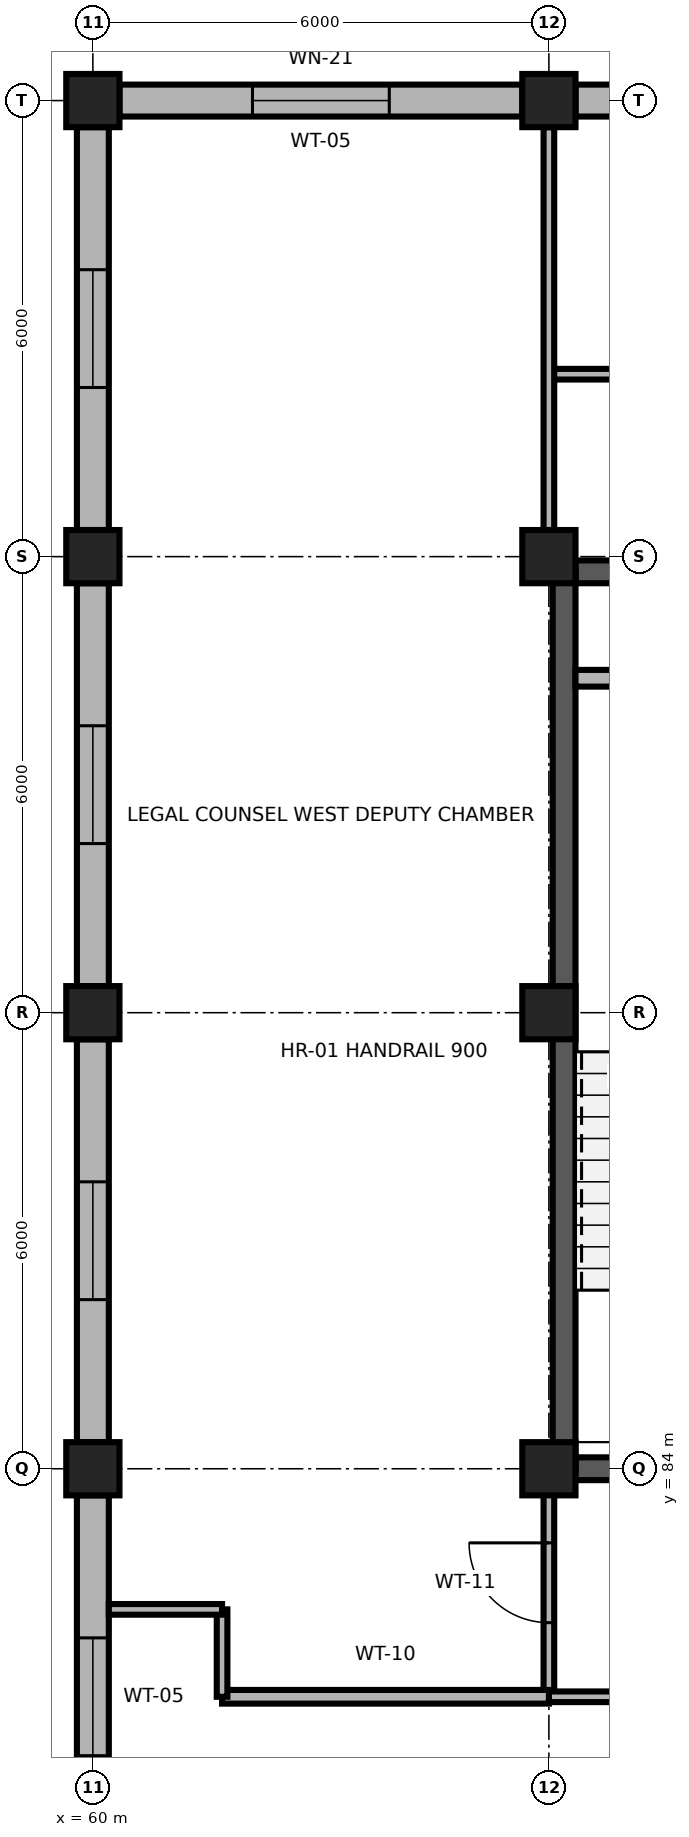
"""IFC4 building model, lengths in metres.
Left out: names, types, materials, properties, quantities, classifications, styles, units other than length and angle.
Written with IfcOpenShell. Run it as: python <this file> out.ifc"""

import sys

from ifc_helpers import new_model, si_unit, direction, frame, frame_2d, origin, origin_2d, place, context, subcontext, project, spatial, rectangle, extrude, element, fill, save


model = new_model("IFC4")
c1 = context("Model", 3, precision=1e-05, world=origin(), true_north=direction((0.0, 1.0)))
c2 = subcontext(c1, "Body", "Model", "MODEL_VIEW")
j1 = project(units=[si_unit("LENGTHUNIT", "METRE"), si_unit("PLANEANGLEUNIT", "RADIAN")], contexts=[c1])
p1 = place(None, origin())
s1 = spatial("IfcSite", under=j1, at=p1, CompositionType="ELEMENT")
p2 = place(p1, origin())
s2 = spatial("IfcBuilding", under=s1, at=p2, CompositionType="ELEMENT")
p3 = place(p2, frame((0.0, 0.0, 60.0)))
s3 = spatial("IfcBuildingStorey", under=s2, at=p3, CompositionType="ELEMENT", Elevation=60.0)
for number, where, z_axis, x_axis in (
    (1, (60.0, 84.0, 0.0), (0.0, 0.0, 1.0), (1.0, 0.0, 0.0)),
    (2, (66.0, 84.0, 0.0), (0.0, 0.0, 1.0), (1.0, 0.0, 0.0)),
    (3, (60.0, 90.0, 0.0), (0.0, 0.0, 1.0), (1.0, 0.0, 0.0)),
    (4, (66.0, 90.0, 0.0), (0.0, 0.0, 1.0), (1.0, 0.0, 0.0)),
    (5, (60.0, 96.0, 0.0), (0.0, 0.0, 1.0), (1.0, 0.0, 0.0)),
    (6, (66.0, 96.0, 0.0), (0.0, 0.0, 1.0), (1.0, 0.0, 0.0)),
    (7, (60.0, 102.0, 0.0), (0.0, 0.0, 1.0), (1.0, 0.0, 0.0)),
    (8, (66.0, 102.0, 0.0), (0.0, 0.0, 1.0), (1.0, 0.0, 0.0)),
):
    element("IfcColumn", number, at=place(p3, frame(where, z_axis=z_axis, x_axis=x_axis)), inside=s3, PredefinedType="COLUMN", context=c2, shape_type="SweptSolid", body=[
        extrude(rectangle(XDim=0.7, YDim=0.7, at=origin_2d()), origin(), (0.0, 0.0, 1.0), 3.9),
    ])
p4 = place(p3, frame((60.35, 102.0, 0.0), z_axis=(0.0, 0.0, 1.0), x_axis=(1.0, 0.0, 0.0)))
e9 = element("IfcWall", 9, at=p4, inside=s3, PredefinedType="SOLIDWALL", context=c2, shape_type="SweptSolid", body=[
    extrude(rectangle(XDim=5.3, YDim=0.42, at=frame_2d((2.65, 0.0))), origin(), (0.0, 0.0, 1.0), 3.32),
])
p5 = place(p4, frame((1.75, 0.0, 0.85)))
e10 = element("IfcOpeningElement", 10, at=p5, cuts=e9, PredefinedType="OPENING", context=c2, shape_type="SweptSolid", body=[
    extrude(rectangle(XDim=1.8, YDim=1.95, at=frame_2d((0.9, 0.975))), frame((0.0, 0.225, 0.0), z_axis=(0.0, -1.0, 0.0), x_axis=(1.0, 0.0, 0.0)), (0.0, 0.0, 1.0), 0.45),
])
p6 = place(p3, frame((66.35, 102.0, 0.0), z_axis=(0.0, 0.0, 1.0), x_axis=(1.0, 0.0, 0.0)))
e11 = element("IfcWall", 11, at=p6, inside=s3, PredefinedType="SOLIDWALL", context=c2, shape_type="SweptSolid", body=[
    extrude(rectangle(XDim=5.3, YDim=0.42, at=frame_2d((2.65, 0.0))), origin(), (0.0, 0.0, 1.0), 3.32),
])
p7 = place(p6, frame((1.75, 0.0, 0.85)))
e12 = element("IfcOpeningElement", 12, at=p7, cuts=e11, PredefinedType="OPENING", context=c2, shape_type="SweptSolid", body=[
    extrude(rectangle(XDim=1.8, YDim=1.95, at=frame_2d((0.9, 0.975))), frame((0.0, 0.225, 0.0), z_axis=(0.0, -1.0, 0.0), x_axis=(1.0, 0.0, 0.0)), (0.0, 0.0, 1.0), 0.45),
])
p8 = place(p3, frame((60.0, 78.35, 0.0), z_axis=(0.0, 0.0, 1.0), x_axis=(0.0, 1.0, 0.0)))
e13 = element("IfcWall", 13, at=p8, inside=s3, PredefinedType="SOLIDWALL", context=c2, shape_type="SweptSolid", body=[
    extrude(rectangle(XDim=5.3, YDim=0.42, at=frame_2d((2.65, 0.0))), origin(), (0.0, 0.0, 1.0), 3.32),
])
p9 = place(p8, frame((1.875, 0.0, 0.85)))
e14 = element("IfcOpeningElement", 14, at=p9, cuts=e13, PredefinedType="OPENING", context=c2, shape_type="SweptSolid", body=[
    extrude(rectangle(XDim=1.55, YDim=1.9, at=frame_2d((0.775, 0.95))), frame((0.0, 0.225, 0.0), z_axis=(0.0, -1.0, 0.0), x_axis=(1.0, 0.0, 0.0)), (0.0, 0.0, 1.0), 0.45),
])
p10 = place(p3, frame((60.0, 84.35, 0.0), z_axis=(0.0, 0.0, 1.0), x_axis=(0.0, 1.0, 0.0)))
e15 = element("IfcWall", 15, at=p10, inside=s3, PredefinedType="SOLIDWALL", context=c2, shape_type="SweptSolid", body=[
    extrude(rectangle(XDim=5.3, YDim=0.42, at=frame_2d((2.65, 0.0))), origin(), (0.0, 0.0, 1.0), 3.32),
])
p11 = place(p10, frame((1.875, 0.0, 0.85)))
e16 = element("IfcOpeningElement", 16, at=p11, cuts=e15, PredefinedType="OPENING", context=c2, shape_type="SweptSolid", body=[
    extrude(rectangle(XDim=1.55, YDim=1.9, at=frame_2d((0.775, 0.95))), frame((0.0, 0.225, 0.0), z_axis=(0.0, -1.0, 0.0), x_axis=(1.0, 0.0, 0.0)), (0.0, 0.0, 1.0), 0.45),
])
p12 = place(p3, frame((60.0, 90.35, 0.0), z_axis=(0.0, 0.0, 1.0), x_axis=(0.0, 1.0, 0.0)))
e17 = element("IfcWall", 17, at=p12, inside=s3, PredefinedType="SOLIDWALL", context=c2, shape_type="SweptSolid", body=[
    extrude(rectangle(XDim=5.3, YDim=0.42, at=frame_2d((2.65, 0.0))), origin(), (0.0, 0.0, 1.0), 3.32),
])
p13 = place(p12, frame((1.875, 0.0, 0.85)))
e18 = element("IfcOpeningElement", 18, at=p13, cuts=e17, PredefinedType="OPENING", context=c2, shape_type="SweptSolid", body=[
    extrude(rectangle(XDim=1.55, YDim=1.9, at=frame_2d((0.775, 0.95))), frame((0.0, 0.225, 0.0), z_axis=(0.0, -1.0, 0.0), x_axis=(1.0, 0.0, 0.0)), (0.0, 0.0, 1.0), 0.45),
])
p14 = place(p3, frame((60.0, 96.35, 0.0), z_axis=(0.0, 0.0, 1.0), x_axis=(0.0, 1.0, 0.0)))
e19 = element("IfcWall", 19, at=p14, inside=s3, PredefinedType="SOLIDWALL", context=c2, shape_type="SweptSolid", body=[
    extrude(rectangle(XDim=5.3, YDim=0.42, at=frame_2d((2.65, 0.0))), origin(), (0.0, 0.0, 1.0), 3.32),
])
p15 = place(p14, frame((1.875, 0.0, 0.85)))
e20 = element("IfcOpeningElement", 20, at=p15, cuts=e19, PredefinedType="OPENING", context=c2, shape_type="SweptSolid", body=[
    extrude(rectangle(XDim=1.55, YDim=1.9, at=frame_2d((0.775, 0.95))), frame((0.0, 0.225, 0.0), z_axis=(0.0, -1.0, 0.0), x_axis=(1.0, 0.0, 0.0)), (0.0, 0.0, 1.0), 0.45),
])
p16 = place(p3, frame((66.35, 84.0, 0.0), z_axis=(0.0, 0.0, 1.0), x_axis=(1.0, 0.0, 0.0)))
e21 = element("IfcWall", 21, at=p16, inside=s3, PredefinedType="SHEAR", context=c2, shape_type="SweptSolid", body=[
    extrude(rectangle(XDim=5.3, YDim=0.3, at=frame_2d((2.65, 0.0))), origin(), (0.0, 0.0, 1.0), 3.66),
])
p17 = place(p16, frame((1.975, 0.0, 0.0)))
e22 = element("IfcOpeningElement", 22, at=p17, cuts=e21, PredefinedType="OPENING", context=c2, shape_type="SweptSolid", body=[
    extrude(rectangle(XDim=1.35, YDim=2.2, at=frame_2d((0.675, 1.1))), frame((0.0, 0.165, 0.0), z_axis=(0.0, -1.0, 0.0), x_axis=(1.0, 0.0, 0.0)), (0.0, 0.0, 1.0), 0.33),
])
p18 = place(p3, frame((66.35, 95.8, 0.0), z_axis=(0.0, 0.0, 1.0), x_axis=(1.0, 0.0, 0.0)))
e23 = element("IfcWall", 23, at=p18, inside=s3, PredefinedType="SHEAR", context=c2, shape_type="SweptSolid", body=[
    extrude(rectangle(XDim=5.3, YDim=0.3, at=frame_2d((2.65, 0.0))), origin(), (0.0, 0.0, 1.0), 3.74),
])
p19 = place(p3, frame((66.2, 84.0, 0.0), z_axis=(0.0, 0.0, 1.0), x_axis=(0.0, 1.0, 0.0)))
e24 = element("IfcWall", 24, at=p19, inside=s3, PredefinedType="SHEAR", context=c2, shape_type="SweptSolid", body=[
    extrude(rectangle(XDim=11.8, YDim=0.3, at=frame_2d((5.9, 0.0))), origin(), (0.0, 0.0, 1.0), 3.74),
])
p20 = place(p3, frame((66.35, 94.4, 0.0), z_axis=(0.0, 0.0, 1.0), x_axis=(1.0, 0.0, 0.0)))
e25 = element("IfcWall", 25, at=p20, inside=s3, PredefinedType="PARTITIONING", context=c2, shape_type="SweptSolid", body=[
    extrude(rectangle(XDim=1.1, YDim=0.22, at=frame_2d((0.55, 0.0))), origin(), (0.0, 0.0, 1.0), 3.74),
])
p21 = place(p3, frame((66.0, 81.05, 0.0), z_axis=(0.0, 0.0, 1.0), x_axis=(0.0, 1.0, 0.0)))
e26 = element("IfcWall", 26, at=p21, inside=s3, PredefinedType="PARTITIONING", context=c2, shape_type="SweptSolid", body=[
    extrude(rectangle(XDim=2.9, YDim=0.14, at=frame_2d((1.45, 0.0))), origin(), (0.0, 0.0, 1.0), 3.449),
])
p22 = place(p21, frame((0.925, 0.0, 0.0)))
e27 = element("IfcOpeningElement", 27, at=p22, cuts=e26, PredefinedType="OPENING", context=c2, shape_type="SweptSolid", body=[
    extrude(rectangle(XDim=1.05, YDim=2.25, at=frame_2d((0.525, 1.125))), frame((0.0, 0.085, 0.0), z_axis=(0.0, -1.0, 0.0), x_axis=(1.0, 0.0, 0.0)), (0.0, 0.0, 1.0), 0.17),
])
p23 = place(p3, frame((66.0, 81.0, 0.0), z_axis=(0.0, 0.0, 1.0), x_axis=(1.0, 0.0, 0.0)))
e28 = element("IfcWall", 28, at=p23, inside=s3, PredefinedType="PARTITIONING", context=c2, shape_type="SweptSolid", body=[
    extrude(rectangle(XDim=6.0, YDim=0.14, at=frame_2d((3.0, 0.0))), origin(), (0.0, 0.0, 1.0), 3.74),
])
p24 = place(p23, frame((2.475, 0.0, 0.0)))
e29 = element("IfcOpeningElement", 29, at=p24, cuts=e28, PredefinedType="OPENING", context=c2, shape_type="SweptSolid", body=[
    extrude(rectangle(XDim=1.05, YDim=2.25, at=frame_2d((0.525, 1.125))), frame((0.0, 0.085, 0.0), z_axis=(0.0, -1.0, 0.0), x_axis=(1.0, 0.0, 0.0)), (0.0, 0.0, 1.0), 0.17),
])
p25 = place(p3, frame((66.0, 98.4, 0.0), z_axis=(0.0, 0.0, 1.0), x_axis=(1.0, 0.0, 0.0)))
e30 = element("IfcWall", 30, at=p25, inside=s3, PredefinedType="PARTITIONING", context=c2, shape_type="SweptSolid", body=[
    extrude(rectangle(XDim=6.0, YDim=0.14, at=frame_2d((3.0, 0.0))), origin(), (0.0, 0.0, 1.0), 3.74),
])
p26 = place(p25, frame((2.54, 0.0, 0.0)))
e31 = element("IfcOpeningElement", 31, at=p26, cuts=e30, PredefinedType="OPENING", context=c2, shape_type="SweptSolid", body=[
    extrude(rectangle(XDim=0.92, YDim=2.15, at=frame_2d((0.46, 1.075))), frame((0.0, 0.085, 0.0), z_axis=(0.0, -1.0, 0.0), x_axis=(1.0, 0.0, 0.0)), (0.0, 0.0, 1.0), 0.17),
])
p27 = place(p3, frame((61.7, 81.0, 0.0), z_axis=(0.0, 0.0, 1.0), x_axis=(1.0, 0.0, 0.0)))
e32 = element("IfcWall", 32, at=p27, inside=s3, PredefinedType="PARTITIONING", context=c2, shape_type="SweptSolid", body=[
    extrude(rectangle(XDim=4.3, YDim=0.18, at=frame_2d((2.15, 0.0))), origin(), (0.0, 0.0, 1.0), 3.74),
])
p28 = place(p3, frame((61.7, 81.0, 0.0), z_axis=(0.0, 0.0, 1.0), x_axis=(0.0, 1.0, 0.0)))
e33 = element("IfcWall", 33, at=p28, inside=s3, PredefinedType="PARTITIONING", context=c2, shape_type="SweptSolid", body=[
    extrude(rectangle(XDim=1.15, YDim=0.14, at=frame_2d((0.575, 0.0))), origin(), (0.0, 0.0, 1.0), 3.74),
])
p29 = place(p3, frame((61.7, 82.15, 0.0), z_axis=(0.0, 0.0, 1.0), x_axis=(-1.0, 0.0, 0.0)))
e34 = element("IfcWall", 34, at=p29, inside=s3, PredefinedType="PARTITIONING", context=c2, shape_type="SweptSolid", body=[
    extrude(rectangle(XDim=1.49, YDim=0.14, at=frame_2d((0.745, 0.0))), origin(), (0.0, 0.0, 1.0), 3.74),
])
p30 = place(p3, frame((66.0, 96.35, 0.0), z_axis=(0.0, 0.0, 1.0), x_axis=(0.0, 1.0, 0.0)))
e35 = element("IfcWall", 35, at=p30, inside=s3, PredefinedType="PARTITIONING", context=c2, shape_type="SweptSolid", body=[
    extrude(rectangle(XDim=5.3, YDim=0.14, at=frame_2d((2.65, 0.0))), origin(), (0.0, 0.0, 1.0), 3.449),
])
p31 = place(p5, origin())
e36 = element("IfcWindow", 36, at=p31, inside=s3, PartitioningType="SINGLE_PANEL", PredefinedType="WINDOW", context=c2, shape_type="SweptSolid", body=[
    extrude(rectangle(XDim=1.8, YDim=1.95, at=frame_2d((0.9, 0.975))), frame((0.0, 0.03, 0.0), z_axis=(0.0, -1.0, 0.0), x_axis=(1.0, 0.0, 0.0)), (0.0, 0.0, 1.0), 0.06),
])
fill(e10, e36)
p32 = place(p9, origin())
e37 = element("IfcWindow", 37, at=p32, inside=s3, PartitioningType="SINGLE_PANEL", PredefinedType="WINDOW", context=c2, shape_type="SweptSolid", body=[
    extrude(rectangle(XDim=1.55, YDim=1.9, at=frame_2d((0.775, 0.95))), frame((0.0, 0.03, 0.0), z_axis=(0.0, -1.0, 0.0), x_axis=(1.0, 0.0, 0.0)), (0.0, 0.0, 1.0), 0.06),
])
fill(e14, e37)
p33 = place(p11, origin())
e38 = element("IfcWindow", 38, at=p33, inside=s3, PartitioningType="SINGLE_PANEL", PredefinedType="WINDOW", context=c2, shape_type="SweptSolid", body=[
    extrude(rectangle(XDim=1.55, YDim=1.9, at=frame_2d((0.775, 0.95))), frame((0.0, 0.03, 0.0), z_axis=(0.0, -1.0, 0.0), x_axis=(1.0, 0.0, 0.0)), (0.0, 0.0, 1.0), 0.06),
])
fill(e16, e38)
p34 = place(p13, origin())
e39 = element("IfcWindow", 39, at=p34, inside=s3, PartitioningType="SINGLE_PANEL", PredefinedType="WINDOW", context=c2, shape_type="SweptSolid", body=[
    extrude(rectangle(XDim=1.55, YDim=1.9, at=frame_2d((0.775, 0.95))), frame((0.0, 0.03, 0.0), z_axis=(0.0, -1.0, 0.0), x_axis=(1.0, 0.0, 0.0)), (0.0, 0.0, 1.0), 0.06),
])
fill(e18, e39)
p35 = place(p15, origin())
e40 = element("IfcWindow", 40, at=p35, inside=s3, PartitioningType="SINGLE_PANEL", PredefinedType="WINDOW", context=c2, shape_type="SweptSolid", body=[
    extrude(rectangle(XDim=1.55, YDim=1.9, at=frame_2d((0.775, 0.95))), frame((0.0, 0.03, 0.0), z_axis=(0.0, -1.0, 0.0), x_axis=(1.0, 0.0, 0.0)), (0.0, 0.0, 1.0), 0.06),
])
fill(e20, e40)
p36 = place(p22, origin())
e41 = element("IfcDoor", 41, at=p36, inside=s3, OperationType="SINGLE_SWING_RIGHT", PredefinedType="DOOR", context=c2, shape_type="SweptSolid", body=[
    extrude(rectangle(XDim=1.05, YDim=2.25, at=frame_2d((0.525, 1.125))), frame((0.0, 0.025, 0.0), z_axis=(0.0, -1.0, 0.0), x_axis=(1.0, 0.0, 0.0)), (0.0, 0.0, 1.0), 0.05),
])
fill(e27, e41)
save(model, sys.argv[1])
